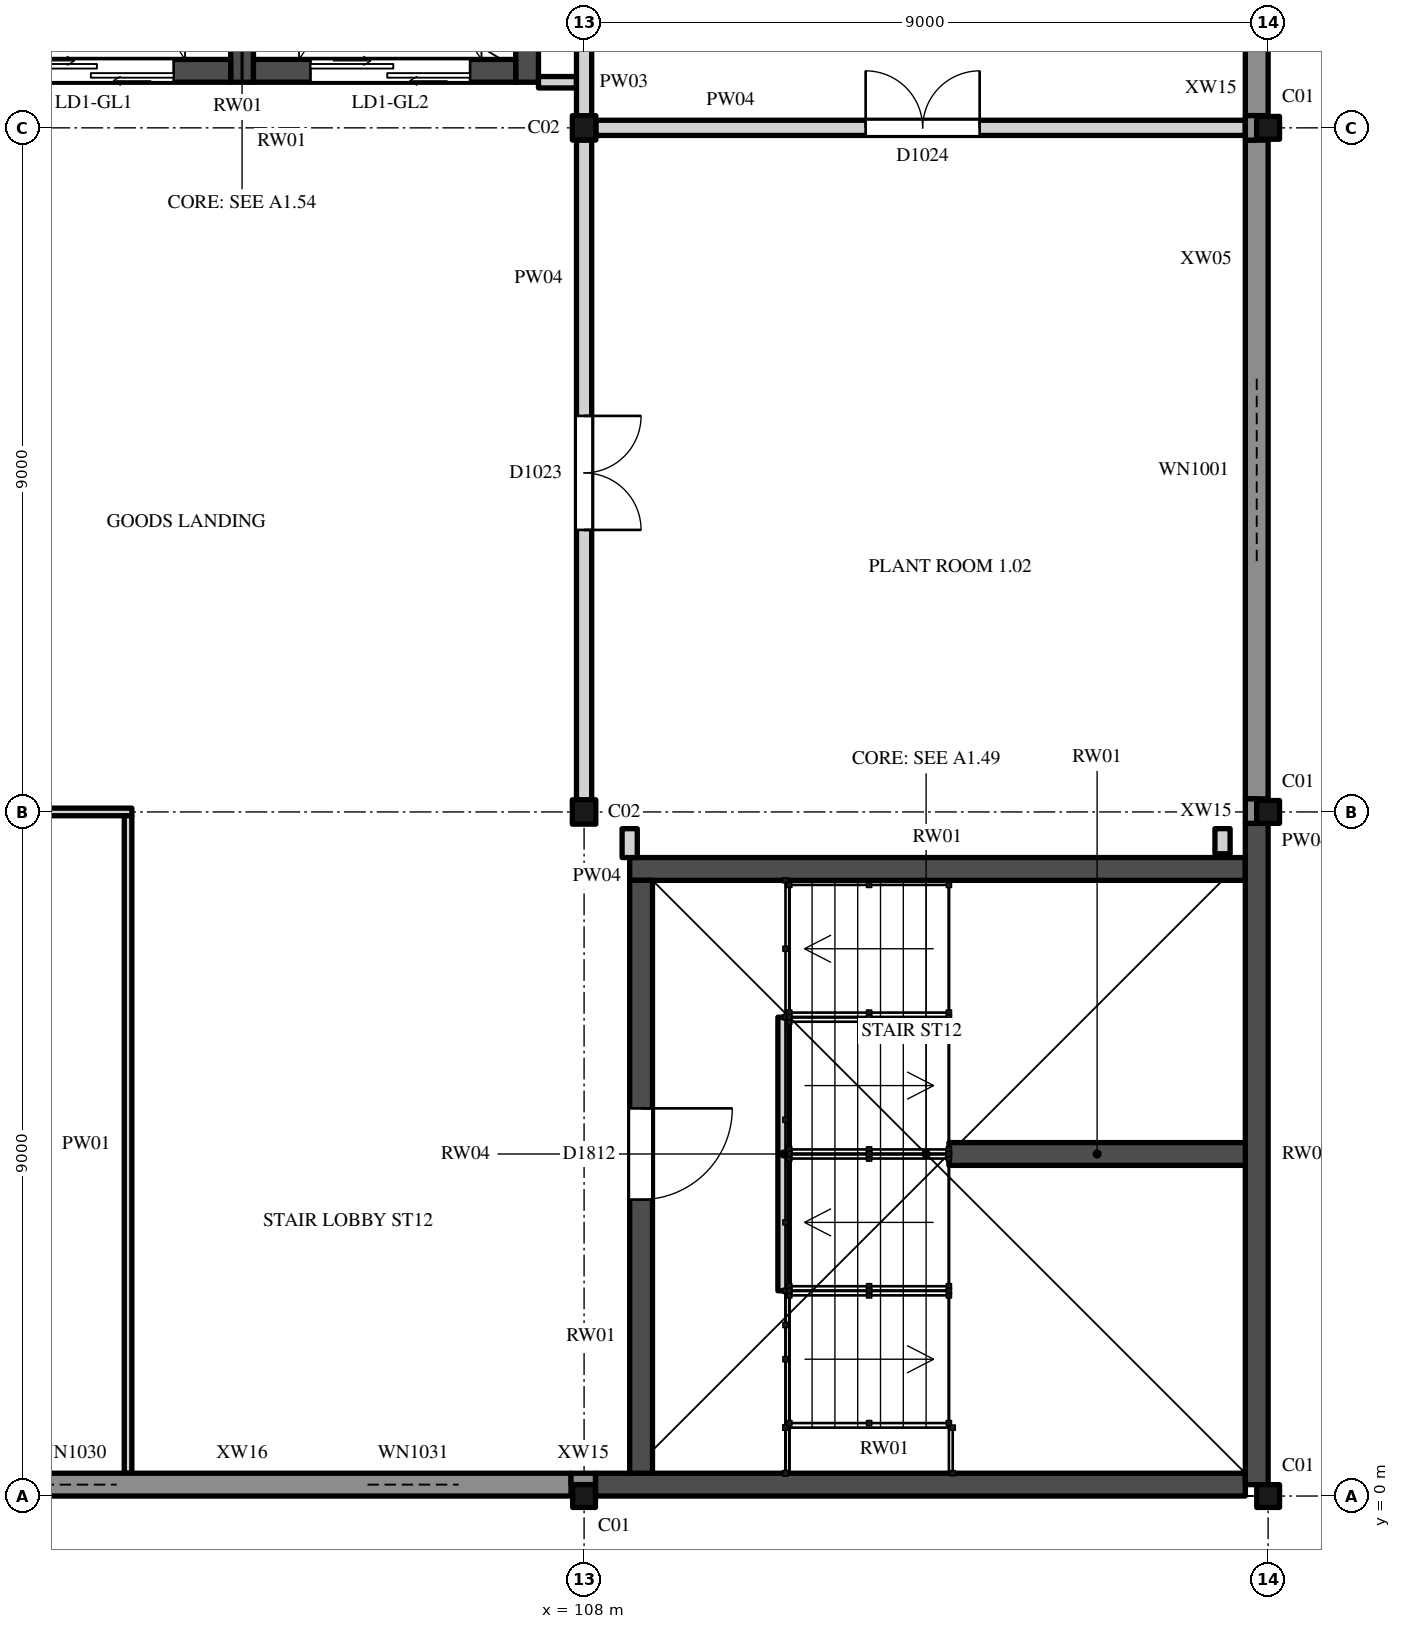
"""IFC4 building model, lengths in metres.
Left out: names, types, materials, properties, quantities, classifications, styles, units other than length and angle.
Written with IfcOpenShell. Run it as: python <this file> out.ifc"""

import sys

from ifc_helpers import new_model, si_unit, direction, frame, frame_2d, origin, origin_2d, place, context, subcontext, project, spatial, rectangle, hollow_rectangle, i_section, extrude, element, fill, save


model = new_model("IFC4")
c1 = context("Model", 3, precision=1e-05, world=origin(), true_north=direction((0.0, 1.0)))
c2 = subcontext(c1, "Body", "Model", "MODEL_VIEW")
j1 = project(units=[si_unit("LENGTHUNIT", "METRE"), si_unit("PLANEANGLEUNIT", "RADIAN")], contexts=[c1])
p1 = place(None, origin())
s1 = spatial("IfcSite", under=j1, at=p1, CompositionType="ELEMENT")
p2 = place(p1, origin())
s2 = spatial("IfcBuilding", under=s1, at=p2, CompositionType="ELEMENT")
p3 = place(p2, frame((0.0, 0.0, 6.0)))
s3 = spatial("IfcBuildingStorey", under=s2, at=p3, CompositionType="ELEMENT", Elevation=6.0)
for number, where, z_axis, x_axis in (
    (1, (108.0, 0.0, 0.0), (0.0, 0.0, 1.0), (1.0, 0.0, 0.0)),
    (2, (117.0, 0.0, 0.0), (0.0, 0.0, 1.0), (1.0, 0.0, 0.0)),
):
    element("IfcColumn", number, at=place(p3, frame(where, z_axis=z_axis, x_axis=x_axis)), inside=s3, PredefinedType="COLUMN", context=c2, shape_type="SweptSolid", body=[
        extrude(hollow_rectangle(XDim=0.3, YDim=0.3, WallThickness=0.012, InnerFilletRadius=0.019, OuterFilletRadius=0.031, at=origin_2d()), origin(), (0.0, 0.0, 1.0), 5.0),
    ])
p4 = place(p3, frame((108.0, 9.0, 0.0), z_axis=(0.0, 0.0, 1.0), x_axis=(1.0, 0.0, 0.0)))
e3 = element("IfcColumn", 3, at=p4, inside=s3, PredefinedType="COLUMN", context=c2, shape_type="SweptSolid", body=[
    extrude(i_section(OverallWidth=0.309, OverallDepth=0.321, WebThickness=0.014, FlangeThickness=0.022, FilletRadius=0.017, at=origin_2d()), origin(), (0.0, 0.0, 1.0), 5.0),
])
p5 = place(p3, frame((117.0, 9.0, 0.0), z_axis=(0.0, 0.0, 1.0), x_axis=(1.0, 0.0, 0.0)))
e4 = element("IfcColumn", 4, at=p5, inside=s3, PredefinedType="COLUMN", context=c2, shape_type="SweptSolid", body=[
    extrude(hollow_rectangle(XDim=0.3, YDim=0.3, WallThickness=0.012, InnerFilletRadius=0.019, OuterFilletRadius=0.031, at=origin_2d()), origin(), (0.0, 0.0, 1.0), 5.0),
])
p6 = place(p3, frame((108.0, 18.0, 0.0), z_axis=(0.0, 0.0, 1.0), x_axis=(1.0, 0.0, 0.0)))
e5 = element("IfcColumn", 5, at=p6, inside=s3, PredefinedType="COLUMN", context=c2, shape_type="SweptSolid", body=[
    extrude(i_section(OverallWidth=0.309, OverallDepth=0.321, WebThickness=0.014, FlangeThickness=0.022, FilletRadius=0.017, at=origin_2d()), origin(), (0.0, 0.0, 1.0), 5.0),
])
p7 = place(p3, frame((117.0, 18.0, 0.0), z_axis=(0.0, 0.0, 1.0), x_axis=(1.0, 0.0, 0.0)))
e6 = element("IfcColumn", 6, at=p7, inside=s3, PredefinedType="COLUMN", context=c2, shape_type="SweptSolid", body=[
    extrude(hollow_rectangle(XDim=0.3, YDim=0.3, WallThickness=0.012, InnerFilletRadius=0.019, OuterFilletRadius=0.031, at=origin_2d()), origin(), (0.0, 0.0, 1.0), 5.0),
])
p8 = place(p3, frame((108.15, 0.15, 0.0), z_axis=(0.0, 0.0, 1.0), x_axis=(1.0, 0.0, 0.0)))
e7 = element("IfcWall", 7, at=p8, inside=s3, PredefinedType="SHEAR", context=c2, shape_type="SweptSolid", body=[
    extrude(rectangle(XDim=8.55, YDim=0.3, at=frame_2d((4.275, 0.0))), origin(), (0.0, 0.0, 1.0), 5.0),
])
p9 = place(p3, frame((108.6, 8.25, 0.0), z_axis=(0.0, 0.0, 1.0), x_axis=(1.0, 0.0, 0.0)))
e8 = element("IfcWall", 8, at=p9, inside=s3, PredefinedType="SHEAR", context=c2, shape_type="SweptSolid", body=[
    extrude(rectangle(XDim=8.1, YDim=0.3, at=frame_2d((4.05, 0.0))), origin(), (0.0, 0.0, 1.0), 5.0),
])
p10 = place(p3, frame((108.75, 0.3, 0.0), z_axis=(0.0, 0.0, 1.0), x_axis=(0.0, 1.0, 0.0)))
e9 = element("IfcWall", 9, at=p10, inside=s3, PredefinedType="SHEAR", context=c2, shape_type="SweptSolid", body=[
    extrude(rectangle(XDim=7.8, YDim=0.3, at=frame_2d((3.9, 0.0))), origin(), (0.0, 0.0, 1.0), 5.0),
])
p11 = place(p10, frame((3.6, 0.0, 0.0)))
e10 = element("IfcOpeningElement", 10, at=p11, cuts=e9, PredefinedType="OPENING", context=c2, shape_type="SweptSolid", body=[
    extrude(rectangle(XDim=1.2, YDim=2.1, at=frame_2d((0.6, 1.05))), frame((0.0, 0.16, 0.0), z_axis=(0.0, -1.0, 0.0), x_axis=(1.0, 0.0, 0.0)), (0.0, 0.0, 1.0), 0.32),
])
p12 = place(p3, frame((116.85, 0.15, 0.0), z_axis=(0.0, 0.0, 1.0), x_axis=(0.0, 1.0, 0.0)))
e11 = element("IfcWall", 11, at=p12, inside=s3, PredefinedType="SHEAR", context=c2, shape_type="SweptSolid", body=[
    extrude(rectangle(XDim=8.7, YDim=0.3, at=frame_2d((4.35, 0.0))), origin(), (0.0, 0.0, 1.0), 5.0),
])
p13 = place(p3, frame((112.8, 4.5, 0.0), z_axis=(0.0, 0.0, 1.0), x_axis=(1.0, 0.0, 0.0)))
e12 = element("IfcWall", 12, at=p13, inside=s3, PredefinedType="SHEAR", context=c2, shape_type="SweptSolid", body=[
    extrude(rectangle(XDim=3.9, YDim=0.3, at=frame_2d((1.95, 0.0))), origin(), (0.0, 0.0, 1.0), 5.0),
])
p14 = place(p3, frame((110.625, 2.7, 0.0), z_axis=(0.0, 0.0, 1.0), x_axis=(0.0, 1.0, 0.0)))
e13 = element("IfcWall", 13, at=p14, inside=s3, PredefinedType="STANDARD", context=c2, shape_type="SweptSolid", body=[
    extrude(rectangle(XDim=3.6, YDim=0.15, at=frame_2d((1.8, 0.0))), origin(), (0.0, 0.0, 1.0), 2.3),
])
for number, where, z_axis, x_axis in (
    (14, (103.5, 18.6, 0.0), (0.0, 0.0, 1.0), (0.0, 1.0, 0.0)),
    (15, (107.25, 18.6, 0.0), (0.0, 0.0, 1.0), (0.0, 1.0, 0.0)),
):
    element("IfcWall", number, at=place(p3, frame(where, z_axis=z_axis, x_axis=x_axis)), inside=s3, PredefinedType="SHEAR", context=c2, shape_type="SweptSolid", body=[
        extrude(rectangle(XDim=4.8, YDim=0.3, at=frame_2d((2.4, 0.0))), origin(), (0.0, 0.0, 1.0), 5.0),
    ])
p15 = place(p3, frame((99.9, 18.75, 0.0), z_axis=(0.0, 0.0, 1.0), x_axis=(1.0, 0.0, 0.0)))
e16 = element("IfcWall", 16, at=p15, inside=s3, PredefinedType="SHEAR", context=c2, shape_type="SweptSolid", body=[
    extrude(rectangle(XDim=3.45, YDim=0.3, at=frame_2d((1.725, 0.0))), origin(), (0.0, 0.0, 1.0), 5.0),
])
p16 = place(p15, frame((0.6, 0.0, 0.0)))
e17 = element("IfcOpeningElement", 17, at=p16, cuts=e16, PredefinedType="OPENING", context=c2, shape_type="SweptSolid", body=[
    extrude(rectangle(XDim=2.1, YDim=2.4, at=frame_2d((1.05, 1.2))), frame((0.0, 0.16, 0.0), z_axis=(0.0, -1.0, 0.0), x_axis=(1.0, 0.0, 0.0)), (0.0, 0.0, 1.0), 0.32),
])
p17 = place(p3, frame((103.65, 18.75, 0.0), z_axis=(0.0, 0.0, 1.0), x_axis=(1.0, 0.0, 0.0)))
e18 = element("IfcWall", 18, at=p17, inside=s3, PredefinedType="SHEAR", context=c2, shape_type="SweptSolid", body=[
    extrude(rectangle(XDim=3.45, YDim=0.3, at=frame_2d((1.725, 0.0))), origin(), (0.0, 0.0, 1.0), 5.0),
])
p18 = place(p17, frame((0.75, 0.0, 0.0)))
e19 = element("IfcOpeningElement", 19, at=p18, cuts=e18, PredefinedType="OPENING", context=c2, shape_type="SweptSolid", body=[
    extrude(rectangle(XDim=2.1, YDim=2.4, at=frame_2d((1.05, 1.2))), frame((0.0, 0.16, 0.0), z_axis=(0.0, -1.0, 0.0), x_axis=(1.0, 0.0, 0.0)), (0.0, 0.0, 1.0), 0.32),
])
p19 = place(p3, frame((99.161, 0.15, 0.0), z_axis=(0.0, 0.0, 1.0), x_axis=(1.0, 0.0, 0.0)))
e20 = element("IfcWall", 20, at=p19, inside=s3, PredefinedType="SOLIDWALL", context=c2, shape_type="SweptSolid", body=[
    extrude(rectangle(XDim=8.667, YDim=0.3, at=frame_2d((4.333, 0.0))), origin(), (0.0, 0.0, 1.0), 4.419),
])
p20 = place(p19, frame((1.489, 0.0, 1.2)))
e21 = element("IfcOpeningElement", 21, at=p20, cuts=e20, PredefinedType="OPENING", context=c2, shape_type="SweptSolid", body=[
    extrude(rectangle(XDim=1.2, YDim=1.5, at=frame_2d((0.6, 0.75))), frame((0.0, 0.16, 0.0), z_axis=(0.0, -1.0, 0.0), x_axis=(1.0, 0.0, 0.0)), (0.0, 0.0, 1.0), 0.32),
])
p21 = place(p19, frame((5.989, 0.0, 1.2)))
e22 = element("IfcOpeningElement", 22, at=p21, cuts=e20, PredefinedType="OPENING", context=c2, shape_type="SweptSolid", body=[
    extrude(rectangle(XDim=1.2, YDim=1.5, at=frame_2d((0.6, 0.75))), frame((0.0, 0.16, 0.0), z_axis=(0.0, -1.0, 0.0), x_axis=(1.0, 0.0, 0.0)), (0.0, 0.0, 1.0), 0.32),
])
p22 = place(p3, frame((116.85, 9.172, 0.0), z_axis=(0.0, 0.0, 1.0), x_axis=(0.0, 1.0, 0.0)))
e23 = element("IfcWall", 23, at=p22, inside=s3, PredefinedType="SOLIDWALL", context=c2, shape_type="SweptSolid", body=[
    extrude(rectangle(XDim=8.667, YDim=0.3, at=frame_2d((4.333, 0.0))), origin(), (0.0, 0.0, 1.0), 4.297),
])
p23 = place(p22, frame((3.128, 0.0, 0.9)))
e24 = element("IfcOpeningElement", 24, at=p23, cuts=e23, PredefinedType="OPENING", context=c2, shape_type="SweptSolid", body=[
    extrude(rectangle(XDim=2.4, YDim=1.8, at=frame_2d((1.2, 0.9))), frame((0.0, 0.16, 0.0), z_axis=(0.0, -1.0, 0.0), x_axis=(1.0, 0.0, 0.0)), (0.0, 0.0, 1.0), 0.32),
])
p24 = place(p3, frame((116.85, 18.161, 0.0), z_axis=(0.0, 0.0, 1.0), x_axis=(0.0, 1.0, 0.0)))
e25 = element("IfcWall", 25, at=p24, inside=s3, PredefinedType="SOLIDWALL", context=c2, shape_type="SweptSolid", body=[
    extrude(rectangle(XDim=8.667, YDim=0.3, at=frame_2d((4.333, 0.0))), origin(), (0.0, 0.0, 1.0), 4.297),
])
p25 = place(p24, frame((1.489, 0.0, 1.2)))
e26 = element("IfcOpeningElement", 26, at=p25, cuts=e25, PredefinedType="OPENING", context=c2, shape_type="SweptSolid", body=[
    extrude(rectangle(XDim=1.2, YDim=1.5, at=frame_2d((0.6, 0.75))), frame((0.0, 0.16, 0.0), z_axis=(0.0, -1.0, 0.0), x_axis=(1.0, 0.0, 0.0)), (0.0, 0.0, 1.0), 0.32),
])
p26 = place(p24, frame((5.989, 0.0, 1.2)))
e27 = element("IfcOpeningElement", 27, at=p26, cuts=e25, PredefinedType="OPENING", context=c2, shape_type="SweptSolid", body=[
    extrude(rectangle(XDim=1.2, YDim=1.5, at=frame_2d((0.6, 0.75))), frame((0.0, 0.16, 0.0), z_axis=(0.0, -1.0, 0.0), x_axis=(1.0, 0.0, 0.0)), (0.0, 0.0, 1.0), 0.32),
])
for number, where, z_axis, x_axis in (
    (28, (107.828, 0.225, 0.0), (0.0, 0.0, 1.0), (1.0, 0.0, 0.0)),
    (29, (116.775, 8.85, 0.0), (0.0, 0.0, 1.0), (0.0, 1.0, 0.0)),
):
    element("IfcWall", number, at=place(p3, frame(where, z_axis=z_axis, x_axis=x_axis)), inside=s3, PredefinedType="SOLIDWALL", context=c2, shape_type="SweptSolid", body=[
        extrude(rectangle(XDim=0.322, YDim=0.15, at=frame_2d((0.161, 0.0))), origin(), (0.0, 0.0, 1.0), 5.0),
    ])
p27 = place(p3, frame((116.775, 17.839, 0.0), z_axis=(0.0, 0.0, 1.0), x_axis=(0.0, 1.0, 0.0)))
e30 = element("IfcWall", 30, at=p27, inside=s3, PredefinedType="SOLIDWALL", context=c2, shape_type="SweptSolid", body=[
    extrude(rectangle(XDim=0.322, YDim=0.15, at=frame_2d((0.161, 0.0))), origin(), (0.0, 0.0, 1.0), 4.297),
])
p28 = place(p3, frame((99.155, 9.0, 0.0), z_axis=(0.0, 0.0, 1.0), x_axis=(1.0, 0.0, 0.0)))
e31 = element("IfcWall", 31, at=p28, inside=s3, PredefinedType="PARTITIONING", context=c2, shape_type="SweptSolid", body=[
    extrude(rectangle(XDim=2.896, YDim=0.1, at=frame_2d((1.448, 0.0))), origin(), (0.0, 0.0, 1.0), 4.419),
])
p29 = place(p3, frame((108.155, 18.0, 0.0), z_axis=(0.0, 0.0, 1.0), x_axis=(1.0, 0.0, 0.0)))
e32 = element("IfcWall", 32, at=p29, inside=s3, PredefinedType="PARTITIONING", context=c2, shape_type="SweptSolid", body=[
    extrude(rectangle(XDim=8.545, YDim=0.2, at=frame_2d((4.273, 0.0))), origin(), (0.0, 0.0, 1.0), 4.419),
])
p30 = place(p29, frame((3.55, 0.0, 0.0)))
e33 = element("IfcOpeningElement", 33, at=p30, cuts=e32, PredefinedType="OPENING", context=c2, shape_type="SweptSolid", body=[
    extrude(rectangle(XDim=1.5, YDim=2.4, at=frame_2d((0.75, 1.2))), frame((0.0, 0.11, 0.0), z_axis=(0.0, -1.0, 0.0), x_axis=(1.0, 0.0, 0.0)), (0.0, 0.0, 1.0), 0.22),
])
p31 = place(p3, frame((107.4, 18.6, 0.0), z_axis=(0.0, 0.0, 1.0), x_axis=(1.0, 0.0, 0.0)))
e34 = element("IfcWall", 34, at=p31, inside=s3, PredefinedType="PARTITIONING", context=c2, shape_type="SweptSolid", body=[
    extrude(rectangle(XDim=0.5, YDim=0.15, at=frame_2d((0.25, 0.0))), origin(), (0.0, 0.0, 1.0), 4.825),
])
p32 = place(p3, frame((102.0, 0.3, 0.0), z_axis=(0.0, 0.0, 1.0), x_axis=(0.0, 1.0, 0.0)))
e35 = element("IfcWall", 35, at=p32, inside=s3, PredefinedType="PARTITIONING", context=c2, shape_type="SweptSolid", body=[
    extrude(rectangle(XDim=8.65, YDim=0.1, at=frame_2d((4.325, 0.0))), origin(), (0.0, 0.0, 1.0), 4.825),
])
p33 = place(p3, frame((108.0, 9.16, 0.0), z_axis=(0.0, 0.0, 1.0), x_axis=(0.0, 1.0, 0.0)))
e36 = element("IfcWall", 36, at=p33, inside=s3, PredefinedType="PARTITIONING", context=c2, shape_type="SweptSolid", body=[
    extrude(rectangle(XDim=8.679, YDim=0.2, at=frame_2d((4.34, 0.0))), origin(), (0.0, 0.0, 1.0), 4.297),
])
p34 = place(p33, frame((3.55, 0.0, 0.0)))
e37 = element("IfcOpeningElement", 37, at=p34, cuts=e36, PredefinedType="OPENING", context=c2, shape_type="SweptSolid", body=[
    extrude(rectangle(XDim=1.5, YDim=2.4, at=frame_2d((0.75, 1.2))), frame((0.0, 0.11, 0.0), z_axis=(0.0, -1.0, 0.0), x_axis=(1.0, 0.0, 0.0)), (0.0, 0.0, 1.0), 0.22),
])
p35 = place(p3, frame((108.0, 18.16, 0.0), z_axis=(0.0, 0.0, 1.0), x_axis=(0.0, 1.0, 0.0)))
e38 = element("IfcWall", 38, at=p35, inside=s3, PredefinedType="PARTITIONING", context=c2, shape_type="SweptSolid", body=[
    extrude(rectangle(XDim=8.679, YDim=0.2, at=frame_2d((4.34, 0.0))), origin(), (0.0, 0.0, 1.0), 4.297),
])
p36 = place(p3, frame((108.6, 8.4, 0.0), z_axis=(0.0, 0.0, 1.0), x_axis=(0.0, 1.0, 0.0)))
e39 = element("IfcWall", 39, at=p36, inside=s3, PredefinedType="PARTITIONING", context=c2, shape_type="SweptSolid", body=[
    extrude(rectangle(XDim=0.38, YDim=0.2, at=frame_2d((0.19, 0.0))), origin(), (0.0, 0.0, 1.0), 4.825),
])
p37 = place(p3, frame((116.4, 8.45, 0.0), z_axis=(0.0, 0.0, 1.0), x_axis=(0.0, 1.0, 0.0)))
e40 = element("IfcWall", 40, at=p37, inside=s3, PredefinedType="PARTITIONING", context=c2, shape_type="SweptSolid", body=[
    extrude(rectangle(XDim=0.33, YDim=0.2, at=frame_2d((0.165, 0.0))), origin(), (0.0, 0.0, 1.0), 4.825),
])
p38 = place(p11, origin())
e41 = element("IfcDoor", 41, at=p38, inside=s3, OperationType="SINGLE_SWING_RIGHT", PredefinedType="DOOR", context=c2, shape_type="SweptSolid", body=[
    extrude(rectangle(XDim=1.2, YDim=2.1, at=frame_2d((0.6, 1.05))), frame((0.0, 0.025, 0.0), z_axis=(0.0, -1.0, 0.0), x_axis=(1.0, 0.0, 0.0)), (0.0, 0.0, 1.0), 0.05),
])
fill(e10, e41)
p39 = place(p16, origin())
e42 = element("IfcDoor", 42, at=p39, inside=s3, OperationType="DOUBLE_DOOR_SLIDING", PredefinedType="DOOR", context=c2, shape_type="SweptSolid", body=[
    extrude(rectangle(XDim=2.1, YDim=2.4, at=frame_2d((1.05, 1.2))), frame((0.0, 0.025, 0.0), z_axis=(0.0, -1.0, 0.0), x_axis=(1.0, 0.0, 0.0)), (0.0, 0.0, 1.0), 0.05),
])
fill(e17, e42)
p40 = place(p18, origin())
e43 = element("IfcDoor", 43, at=p40, inside=s3, OperationType="DOUBLE_DOOR_SLIDING", PredefinedType="DOOR", context=c2, shape_type="SweptSolid", body=[
    extrude(rectangle(XDim=2.1, YDim=2.4, at=frame_2d((1.05, 1.2))), frame((0.0, 0.025, 0.0), z_axis=(0.0, -1.0, 0.0), x_axis=(1.0, 0.0, 0.0)), (0.0, 0.0, 1.0), 0.05),
])
fill(e19, e43)
p41 = place(p23, origin())
e44 = element("IfcWindow", 44, at=p41, inside=s3, PartitioningType="TRIPLE_PANEL_VERTICAL", PredefinedType="WINDOW", context=c2, shape_type="SweptSolid", body=[
    extrude(rectangle(XDim=2.4, YDim=1.8, at=frame_2d((1.2, 0.9))), frame((0.0, 0.03, 0.0), z_axis=(0.0, -1.0, 0.0), x_axis=(1.0, 0.0, 0.0)), (0.0, 0.0, 1.0), 0.06),
])
fill(e24, e44)
p42 = place(p20, origin())
e45 = element("IfcWindow", 45, at=p42, inside=s3, PartitioningType="SINGLE_PANEL", PredefinedType="WINDOW", context=c2, shape_type="SweptSolid", body=[
    extrude(rectangle(XDim=1.2, YDim=1.5, at=frame_2d((0.6, 0.75))), frame((0.0, 0.03, 0.0), z_axis=(0.0, -1.0, 0.0), x_axis=(1.0, 0.0, 0.0)), (0.0, 0.0, 1.0), 0.06),
])
fill(e21, e45)
p43 = place(p21, origin())
e46 = element("IfcWindow", 46, at=p43, inside=s3, PartitioningType="SINGLE_PANEL", PredefinedType="WINDOW", context=c2, shape_type="SweptSolid", body=[
    extrude(rectangle(XDim=1.2, YDim=1.5, at=frame_2d((0.6, 0.75))), frame((0.0, 0.03, 0.0), z_axis=(0.0, -1.0, 0.0), x_axis=(1.0, 0.0, 0.0)), (0.0, 0.0, 1.0), 0.06),
])
fill(e22, e46)
p44 = place(p34, origin())
e47 = element("IfcDoor", 47, at=p44, inside=s3, OperationType="DOUBLE_DOOR_SINGLE_SWING", PredefinedType="DOOR", context=c2, shape_type="SweptSolid", body=[
    extrude(rectangle(XDim=1.5, YDim=2.4, at=frame_2d((0.75, 1.2))), frame((0.0, 0.025, 0.0), z_axis=(0.0, -1.0, 0.0), x_axis=(1.0, 0.0, 0.0)), (0.0, 0.0, 1.0), 0.05),
])
fill(e37, e47)
p45 = place(p30, origin())
e48 = element("IfcDoor", 48, at=p45, inside=s3, OperationType="DOUBLE_DOOR_SINGLE_SWING", PredefinedType="DOOR", context=c2, shape_type="SweptSolid", body=[
    extrude(rectangle(XDim=1.5, YDim=2.4, at=frame_2d((0.75, 1.2))), frame((0.0, 0.025, 0.0), z_axis=(0.0, -1.0, 0.0), x_axis=(1.0, 0.0, 0.0)), (0.0, 0.0, 1.0), 0.05),
])
fill(e33, e48)
save(model, sys.argv[1])
